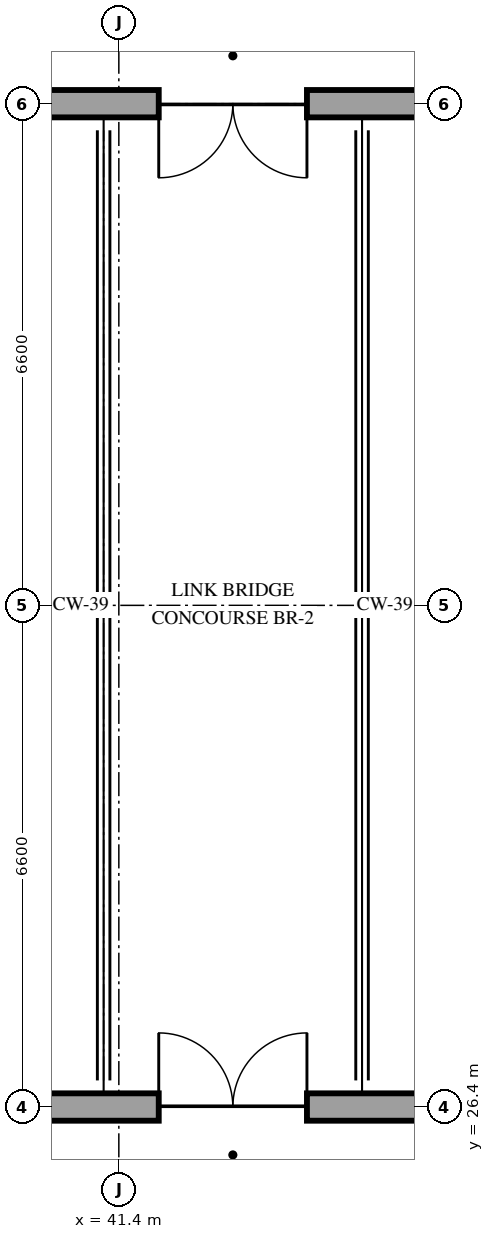
"""IFC4 building model, lengths in metres.
Left out: names, types, materials, properties, quantities, classifications, styles, units other than length and angle.
Written with IfcOpenShell. Run it as: python <this file> out.ifc"""

import sys

from ifc_helpers import new_model, si_unit, direction, frame, frame_2d, origin, place, context, subcontext, project, spatial, rectangle, extrude, element, fill, save


model = new_model("IFC4")
c1 = context("Model", 3, precision=1e-05, world=origin(), true_north=direction((0.0, 1.0)))
c2 = subcontext(c1, "Body", "Model", "MODEL_VIEW")
j1 = project(units=[si_unit("LENGTHUNIT", "METRE"), si_unit("PLANEANGLEUNIT", "RADIAN")], contexts=[c1])
p1 = place(None, origin())
s1 = spatial("IfcSite", under=j1, at=p1, CompositionType="ELEMENT")
p2 = place(p1, origin())
s2 = spatial("IfcBuilding", under=s1, at=p2, CompositionType="ELEMENT")
p3 = place(p2, frame((0.0, 0.0, 10.2)))
s3 = spatial("IfcBuildingStorey", under=s2, at=p3, CompositionType="ELEMENT", Elevation=10.2)
p4 = place(p3, frame((39.85, 26.4, 0.0), z_axis=(0.0, 0.0, 1.0), x_axis=(1.0, 0.0, 0.0)))
e1 = element("IfcWall", 1, at=p4, inside=s3, PredefinedType="STANDARD", context=c2, shape_type="SweptSolid", body=[
    extrude(rectangle(XDim=6.1, YDim=0.36, at=frame_2d((3.05, 0.0))), origin(), (0.0, 0.0, 1.0), 3.36),
])
p5 = place(p4, frame((2.075, 0.0, 0.0)))
e2 = element("IfcOpeningElement", 2, at=p5, cuts=e1, PredefinedType="OPENING", context=c2, shape_type="SweptSolid", body=[
    extrude(rectangle(XDim=1.95, YDim=2.35, at=frame_2d((0.975, 1.175))), frame((0.0, 0.195, 0.0), z_axis=(0.0, -1.0, 0.0), x_axis=(1.0, 0.0, 0.0)), (0.0, 0.0, 1.0), 0.39),
])
p6 = place(p3, frame((45.805, 39.6, 0.0), z_axis=(0.0, 0.0, 1.0), x_axis=(-1.0, 0.0, 0.0)))
e3 = element("IfcWall", 3, at=p6, inside=s3, PredefinedType="STANDARD", context=c2, shape_type="SweptSolid", body=[
    extrude(rectangle(XDim=5.81, YDim=0.36, at=frame_2d((2.905, 0.0))), origin(), (0.0, 0.0, 1.0), 3.95),
])
p7 = place(p6, frame((1.93, 0.0, 0.0)))
e4 = element("IfcOpeningElement", 4, at=p7, cuts=e3, PredefinedType="OPENING", context=c2, shape_type="SweptSolid", body=[
    extrude(rectangle(XDim=1.95, YDim=2.35, at=frame_2d((0.975, 1.175))), frame((0.0, 0.195, 0.0), z_axis=(0.0, -1.0, 0.0), x_axis=(1.0, 0.0, 0.0)), (0.0, 0.0, 1.0), 0.39),
])
p8 = place(p5, origin())
e5 = element("IfcDoor", 5, at=p8, inside=s3, OperationType="DOUBLE_DOOR_SINGLE_SWING", PredefinedType="DOOR", context=c2, shape_type="SweptSolid", body=[
    extrude(rectangle(XDim=1.95, YDim=2.35, at=frame_2d((0.975, 1.175))), frame((0.0, 0.025, 0.0), z_axis=(0.0, -1.0, 0.0), x_axis=(1.0, 0.0, 0.0)), (0.0, 0.0, 1.0), 0.05),
])
fill(e2, e5)
p9 = place(p7, origin())
e6 = element("IfcDoor", 6, at=p9, inside=s3, OperationType="DOUBLE_DOOR_SINGLE_SWING", PredefinedType="DOOR", context=c2, shape_type="SweptSolid", body=[
    extrude(rectangle(XDim=1.95, YDim=2.35, at=frame_2d((0.975, 1.175))), frame((0.0, 0.025, 0.0), z_axis=(0.0, -1.0, 0.0), x_axis=(1.0, 0.0, 0.0)), (0.0, 0.0, 1.0), 0.05),
])
fill(e4, e6)
save(model, sys.argv[1])
